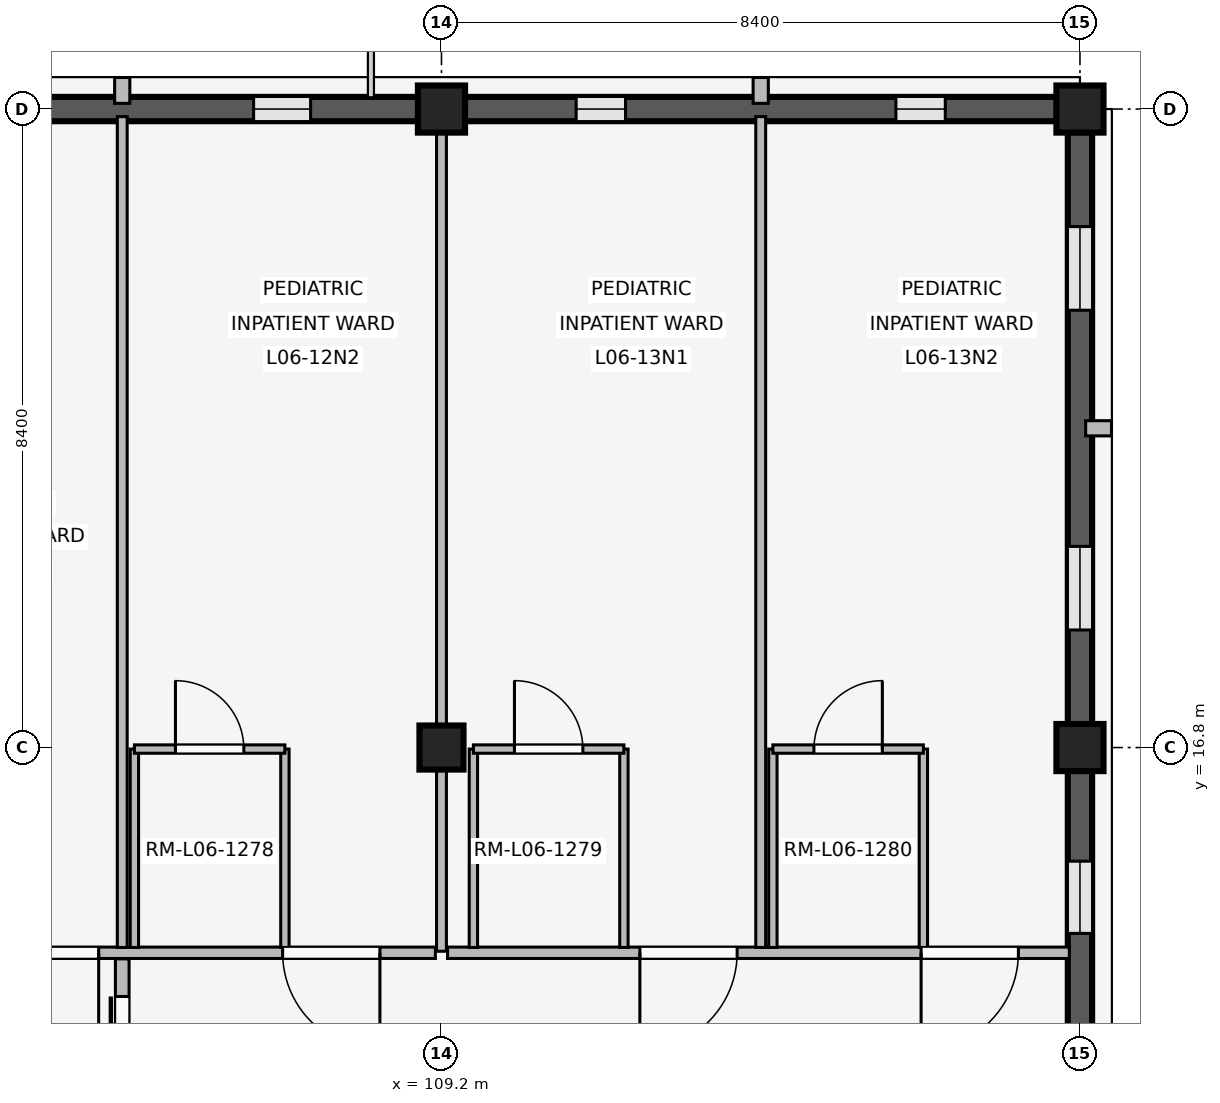
"""IFC4 building model, lengths in metres.
Left out: names, types, materials, properties, quantities, classifications, styles, units other than length and angle.
Written with IfcOpenShell. Run it as: python <this file> out.ifc"""

import sys

from ifc_helpers import new_model, si_unit, direction, frame, frame_2d, origin, origin_2d, place, context, subcontext, project, spatial, rectangle, extrude, element, fill, save


model = new_model("IFC4")
c1 = context("Model", 3, precision=1e-05, world=origin(), true_north=direction((0.0, 1.0)))
c2 = subcontext(c1, "Body", "Model", "MODEL_VIEW")
j1 = project(units=[si_unit("LENGTHUNIT", "METRE"), si_unit("PLANEANGLEUNIT", "RADIAN")], contexts=[c1])
p1 = place(None, origin())
s1 = spatial("IfcSite", under=j1, at=p1, CompositionType="ELEMENT")
p2 = place(p1, origin())
s2 = spatial("IfcBuilding", under=s1, at=p2, CompositionType="ELEMENT")
p3 = place(p2, frame((0.0, 0.0, 24.6)))
s3 = spatial("IfcBuildingStorey", under=s2, at=p3, CompositionType="ELEMENT", Elevation=24.6)
p4 = place(p3, frame((109.2, 16.8, 0.0), z_axis=(0.0, 0.0, 1.0), x_axis=(1.0, 0.0, 0.0)))
e1 = element("IfcColumn", 1, at=p4, inside=s3, PredefinedType="COLUMN", context=c2, shape_type="SweptSolid", body=[
    extrude(rectangle(XDim=0.58, YDim=0.58, at=origin_2d()), origin(), (0.0, 0.0, 1.0), 4.2),
])
for number, where, z_axis, x_axis in (
    (2, (109.2, 25.2, 0.0), (0.0, 0.0, 1.0), (1.0, 0.0, 0.0)),
    (3, (117.6, 16.8, 0.0), (0.0, 0.0, 1.0), (1.0, 0.0, 0.0)),
    (4, (117.6, 25.2, 0.0), (0.0, 0.0, 1.0), (1.0, 0.0, 0.0)),
):
    element("IfcColumn", number, at=place(p3, frame(where, z_axis=z_axis, x_axis=x_axis)), inside=s3, PredefinedType="COLUMN", context=c2, shape_type="SweptSolid", body=[
        extrude(rectangle(XDim=0.62, YDim=0.62, at=origin_2d()), origin(), (0.0, 0.0, 1.0), 4.2),
    ])
p5 = place(p3, frame((101.105, 25.2, 0.0), z_axis=(0.0, 0.0, 1.0), x_axis=(1.0, 0.0, 0.0)))
e5 = element("IfcWall", 5, at=p5, inside=s3, PredefinedType="SOLIDWALL", context=c2, shape_type="SweptSolid", body=[
    extrude(rectangle(XDim=7.79, YDim=0.32, at=frame_2d((3.895, 0.0))), origin(), (0.0, 0.0, 1.0), 3.34),
])
p6 = place(p5, frame((1.417, 0.0, 0.85)))
e6 = element("IfcOpeningElement", 6, at=p6, cuts=e5, PredefinedType="OPENING", context=c2, shape_type="SweptSolid", body=[
    extrude(rectangle(XDim=0.75, YDim=1.85, at=frame_2d((0.375, 0.925))), frame((0.0, 0.17, 0.0), z_axis=(0.0, -1.0, 0.0), x_axis=(1.0, 0.0, 0.0)), (0.0, 0.0, 1.0), 0.34),
])
p7 = place(p5, frame((5.623, 0.0, 0.85)))
e7 = element("IfcOpeningElement", 7, at=p7, cuts=e5, PredefinedType="OPENING", context=c2, shape_type="SweptSolid", body=[
    extrude(rectangle(XDim=0.75, YDim=1.85, at=frame_2d((0.375, 0.925))), frame((0.0, 0.17, 0.0), z_axis=(0.0, -1.0, 0.0), x_axis=(1.0, 0.0, 0.0)), (0.0, 0.0, 1.0), 0.34),
])
p8 = place(p3, frame((105.0, 25.275, 0.0), z_axis=(0.0, 0.0, 1.0), x_axis=(0.0, 1.0, 0.0)))
e8 = element("IfcWall", 8, at=p8, inside=s3, PredefinedType="ELEMENTEDWALL", context=c2, shape_type="SweptSolid", body=[
    extrude(rectangle(XDim=0.34, YDim=0.2, at=frame_2d((0.17, 0.0))), origin(), (0.0, 0.0, 1.0), 3.32),
])
p9 = place(p3, frame((117.6, 16.495, 0.0), z_axis=(0.0, 0.0, 1.0), x_axis=(0.0, -1.0, 0.0)))
e9 = element("IfcWall", 9, at=p9, inside=s3, PredefinedType="SOLIDWALL", context=c2, shape_type="SweptSolid", body=[
    extrude(rectangle(XDim=7.79, YDim=0.32, at=frame_2d((3.895, 0.0))), origin(), (0.0, 0.0, 1.0), 3.34),
])
p10 = place(p9, frame((1.19, 0.0, 0.85)))
e10 = element("IfcOpeningElement", 10, at=p10, cuts=e9, PredefinedType="OPENING", context=c2, shape_type="SweptSolid", body=[
    extrude(rectangle(XDim=0.95, YDim=1.6, at=frame_2d((0.475, 0.8))), frame((0.0, 0.17, 0.0), z_axis=(0.0, -1.0, 0.0), x_axis=(1.0, 0.0, 0.0)), (0.0, 0.0, 1.0), 0.34),
])
p11 = place(p9, frame((5.65, 0.0, 0.85)))
e11 = element("IfcOpeningElement", 11, at=p11, cuts=e9, PredefinedType="OPENING", context=c2, shape_type="SweptSolid", body=[
    extrude(rectangle(XDim=0.95, YDim=1.6, at=frame_2d((0.475, 0.8))), frame((0.0, 0.17, 0.0), z_axis=(0.0, -1.0, 0.0), x_axis=(1.0, 0.0, 0.0)), (0.0, 0.0, 1.0), 0.34),
])
p12 = place(p3, frame((109.505, 25.2, 0.0), z_axis=(0.0, 0.0, 1.0), x_axis=(1.0, 0.0, 0.0)))
e12 = element("IfcWall", 12, at=p12, inside=s3, PredefinedType="SOLIDWALL", context=c2, shape_type="SweptSolid", body=[
    extrude(rectangle(XDim=7.79, YDim=0.32, at=frame_2d((3.895, 0.0))), origin(), (0.0, 0.0, 1.0), 3.34),
])
p13 = place(p12, frame((1.467, 0.0, 0.85)))
e13 = element("IfcOpeningElement", 13, at=p13, cuts=e12, PredefinedType="OPENING", context=c2, shape_type="SweptSolid", body=[
    extrude(rectangle(XDim=0.65, YDim=1.75, at=frame_2d((0.325, 0.875))), frame((0.0, 0.17, 0.0), z_axis=(0.0, -1.0, 0.0), x_axis=(1.0, 0.0, 0.0)), (0.0, 0.0, 1.0), 0.34),
])
p14 = place(p12, frame((5.673, 0.0, 0.85)))
e14 = element("IfcOpeningElement", 14, at=p14, cuts=e12, PredefinedType="OPENING", context=c2, shape_type="SweptSolid", body=[
    extrude(rectangle(XDim=0.65, YDim=1.75, at=frame_2d((0.325, 0.875))), frame((0.0, 0.17, 0.0), z_axis=(0.0, -1.0, 0.0), x_axis=(1.0, 0.0, 0.0)), (0.0, 0.0, 1.0), 0.34),
])
p15 = place(p3, frame((113.4, 25.275, 0.0), z_axis=(0.0, 0.0, 1.0), x_axis=(0.0, 1.0, 0.0)))
e15 = element("IfcWall", 15, at=p15, inside=s3, PredefinedType="ELEMENTEDWALL", context=c2, shape_type="SweptSolid", body=[
    extrude(rectangle(XDim=0.34, YDim=0.2, at=frame_2d((0.17, 0.0))), origin(), (0.0, 0.0, 1.0), 3.32),
])
p16 = place(p3, frame((117.6, 24.895, 0.0), z_axis=(0.0, 0.0, 1.0), x_axis=(0.0, -1.0, 0.0)))
e16 = element("IfcWall", 16, at=p16, inside=s3, PredefinedType="SOLIDWALL", context=c2, shape_type="SweptSolid", body=[
    extrude(rectangle(XDim=7.79, YDim=0.32, at=frame_2d((3.895, 0.0))), origin(), (0.0, 0.0, 1.0), 3.34),
])
p17 = place(p16, frame((1.242, 0.0, 0.85)))
e17 = element("IfcOpeningElement", 17, at=p17, cuts=e16, PredefinedType="OPENING", context=c2, shape_type="SweptSolid", body=[
    extrude(rectangle(XDim=1.1, YDim=1.6, at=frame_2d((0.55, 0.8))), frame((0.0, 0.17, 0.0), z_axis=(0.0, -1.0, 0.0), x_axis=(1.0, 0.0, 0.0)), (0.0, 0.0, 1.0), 0.34),
])
p18 = place(p16, frame((5.448, 0.0, 0.85)))
e18 = element("IfcOpeningElement", 18, at=p18, cuts=e16, PredefinedType="OPENING", context=c2, shape_type="SweptSolid", body=[
    extrude(rectangle(XDim=1.1, YDim=1.6, at=frame_2d((0.55, 0.8))), frame((0.0, 0.17, 0.0), z_axis=(0.0, -1.0, 0.0), x_axis=(1.0, 0.0, 0.0)), (0.0, 0.0, 1.0), 0.34),
])
p19 = place(p3, frame((117.675, 21.0, 0.0), z_axis=(0.0, 0.0, 1.0), x_axis=(1.0, 0.0, 0.0)))
e19 = element("IfcWall", 19, at=p19, inside=s3, PredefinedType="ELEMENTEDWALL", context=c2, shape_type="SweptSolid", body=[
    extrude(rectangle(XDim=0.34, YDim=0.2, at=frame_2d((0.17, 0.0))), origin(), (0.0, 0.0, 1.0), 3.32),
])
p20 = place(p3, frame((109.12, 14.1, 0.0), z_axis=(0.0, 0.0, 1.0), x_axis=(-1.0, 0.0, 0.0)))
e20 = element("IfcWall", 20, at=p20, inside=s3, PredefinedType="PARTITIONING", context=c2, shape_type="SweptSolid", body=[
    extrude(rectangle(XDim=7.96, YDim=0.15, at=frame_2d((3.98, 0.0))), origin(), (0.0, 0.0, 1.0), 3.32),
])
p21 = place(p20, frame((0.73, 0.0, 0.0)))
e21 = element("IfcOpeningElement", 21, at=p21, cuts=e20, PredefinedType="OPENING", context=c2, shape_type="SweptSolid", body=[
    extrude(rectangle(XDim=1.28, YDim=2.2, at=frame_2d((0.64, 1.1))), frame((0.0, 0.085, 0.0), z_axis=(0.0, -1.0, 0.0), x_axis=(1.0, 0.0, 0.0)), (0.0, 0.0, 1.0), 0.17),
])
p22 = place(p20, frame((4.43, 0.0, 0.0)))
e22 = element("IfcOpeningElement", 22, at=p22, cuts=e20, PredefinedType="OPENING", context=c2, shape_type="SweptSolid", body=[
    extrude(rectangle(XDim=1.28, YDim=2.2, at=frame_2d((0.64, 1.1))), frame((0.0, 0.085, 0.0), z_axis=(0.0, -1.0, 0.0), x_axis=(1.0, 0.0, 0.0)), (0.0, 0.0, 1.0), 0.17),
])
p23 = place(p3, frame((105.0, 14.17, 0.0), z_axis=(0.0, 0.0, 1.0), x_axis=(0.0, 1.0, 0.0)))
e23 = element("IfcWall", 23, at=p23, inside=s3, PredefinedType="PARTITIONING", context=c2, shape_type="SweptSolid", body=[
    extrude(rectangle(XDim=10.93, YDim=0.13, at=frame_2d((5.465, 0.0))), origin(), (0.0, 0.0, 1.0), 3.32),
])
for number, where, z_axis, x_axis in (
    (24, (105.16, 14.17, 0.0), (0.0, 0.0, 1.0), (0.0, 1.0, 0.0)),
    (25, (107.14, 14.17, 0.0), (0.0, 0.0, 1.0), (0.0, 1.0, 0.0)),
):
    element("IfcWall", number, at=place(p3, frame(where, z_axis=z_axis, x_axis=x_axis)), inside=s3, PredefinedType="PARTITIONING", context=c2, shape_type="SweptSolid", body=[
        extrude(rectangle(XDim=2.61, YDim=0.11, at=frame_2d((1.305, 0.0))), origin(), (0.0, 0.0, 1.0), 3.32),
    ])
p24 = place(p3, frame((105.16, 16.78, 0.0), z_axis=(0.0, 0.0, 1.0), x_axis=(1.0, 0.0, 0.0)))
e26 = element("IfcWall", 26, at=p24, inside=s3, PredefinedType="PARTITIONING", context=c2, shape_type="SweptSolid", body=[
    extrude(rectangle(XDim=1.98, YDim=0.11, at=frame_2d((0.99, 0.0))), origin(), (0.0, 0.0, 1.0), 3.32),
])
p25 = place(p24, frame((0.54, 0.0, 0.0)))
e27 = element("IfcOpeningElement", 27, at=p25, cuts=e26, PredefinedType="OPENING", context=c2, shape_type="SweptSolid", body=[
    extrude(rectangle(XDim=0.9, YDim=2.1, at=frame_2d((0.45, 1.05))), frame((0.0, 0.065, 0.0), z_axis=(0.0, -1.0, 0.0), x_axis=(1.0, 0.0, 0.0)), (0.0, 0.0, 1.0), 0.13),
])
p26 = place(p3, frame((105.0, 11.18, 0.0), z_axis=(0.0, 0.0, 1.0), x_axis=(0.0, 1.0, 0.0)))
e28 = element("IfcWall", 28, at=p26, inside=s3, PredefinedType="PARTITIONING", context=c2, shape_type="SweptSolid", body=[
    extrude(rectangle(XDim=2.84, YDim=0.18, at=frame_2d((1.42, 0.0))), origin(), (0.0, 0.0, 1.0), 3.32),
])
p27 = place(p26, frame((0.495, 0.0, 0.0)))
e29 = element("IfcOpeningElement", 29, at=p27, cuts=e28, PredefinedType="OPENING", context=c2, shape_type="SweptSolid", body=[
    extrude(rectangle(XDim=1.85, YDim=2.3, at=frame_2d((0.925, 1.15))), frame((0.0, 0.1, 0.0), z_axis=(0.0, -1.0, 0.0), x_axis=(1.0, 0.0, 0.0)), (0.0, 0.0, 1.0), 0.2),
])
p28 = place(p3, frame((109.2, 14.12, 0.0), z_axis=(0.0, 0.0, 1.0), x_axis=(0.0, 1.0, 0.0)))
e30 = element("IfcWall", 30, at=p28, inside=s3, PredefinedType="PARTITIONING", context=c2, shape_type="SweptSolid", body=[
    extrude(rectangle(XDim=10.94, YDim=0.13, at=frame_2d((5.47, 0.0))), origin(), (0.0, 0.0, 1.0), 3.32),
])
p29 = place(p3, frame((117.46, 14.1, 0.0), z_axis=(0.0, 0.0, 1.0), x_axis=(-1.0, 0.0, 0.0)))
e31 = element("IfcWall", 31, at=p29, inside=s3, PredefinedType="PARTITIONING", context=c2, shape_type="SweptSolid", body=[
    extrude(rectangle(XDim=8.18, YDim=0.15, at=frame_2d((4.09, 0.0))), origin(), (0.0, 0.0, 1.0), 3.32),
])
p30 = place(p29, frame((0.67, 0.0, 0.0)))
e32 = element("IfcOpeningElement", 32, at=p30, cuts=e31, PredefinedType="OPENING", context=c2, shape_type="SweptSolid", body=[
    extrude(rectangle(XDim=1.28, YDim=2.2, at=frame_2d((0.64, 1.1))), frame((0.0, 0.085, 0.0), z_axis=(0.0, -1.0, 0.0), x_axis=(1.0, 0.0, 0.0)), (0.0, 0.0, 1.0), 0.17),
])
p31 = place(p29, frame((4.37, 0.0, 0.0)))
e33 = element("IfcOpeningElement", 33, at=p31, cuts=e31, PredefinedType="OPENING", context=c2, shape_type="SweptSolid", body=[
    extrude(rectangle(XDim=1.28, YDim=2.2, at=frame_2d((0.64, 1.1))), frame((0.0, 0.085, 0.0), z_axis=(0.0, -1.0, 0.0), x_axis=(1.0, 0.0, 0.0)), (0.0, 0.0, 1.0), 0.17),
])
p32 = place(p3, frame((113.4, 14.17, 0.0), z_axis=(0.0, 0.0, 1.0), x_axis=(0.0, 1.0, 0.0)))
e34 = element("IfcWall", 34, at=p32, inside=s3, PredefinedType="PARTITIONING", context=c2, shape_type="SweptSolid", body=[
    extrude(rectangle(XDim=10.93, YDim=0.13, at=frame_2d((5.465, 0.0))), origin(), (0.0, 0.0, 1.0), 3.32),
])
for number, where, z_axis, x_axis in (
    (35, (109.62, 14.17, 0.0), (0.0, 0.0, 1.0), (0.0, 1.0, 0.0)),
    (36, (111.6, 14.17, 0.0), (0.0, 0.0, 1.0), (0.0, 1.0, 0.0)),
):
    element("IfcWall", number, at=place(p3, frame(where, z_axis=z_axis, x_axis=x_axis)), inside=s3, PredefinedType="PARTITIONING", context=c2, shape_type="SweptSolid", body=[
        extrude(rectangle(XDim=2.61, YDim=0.11, at=frame_2d((1.305, 0.0))), origin(), (0.0, 0.0, 1.0), 3.32),
    ])
p33 = place(p3, frame((109.62, 16.78, 0.0), z_axis=(0.0, 0.0, 1.0), x_axis=(1.0, 0.0, 0.0)))
e37 = element("IfcWall", 37, at=p33, inside=s3, PredefinedType="PARTITIONING", context=c2, shape_type="SweptSolid", body=[
    extrude(rectangle(XDim=1.98, YDim=0.11, at=frame_2d((0.99, 0.0))), origin(), (0.0, 0.0, 1.0), 3.32),
])
p34 = place(p33, frame((0.54, 0.0, 0.0)))
e38 = element("IfcOpeningElement", 38, at=p34, cuts=e37, PredefinedType="OPENING", context=c2, shape_type="SweptSolid", body=[
    extrude(rectangle(XDim=0.9, YDim=2.1, at=frame_2d((0.45, 1.05))), frame((0.0, 0.065, 0.0), z_axis=(0.0, -1.0, 0.0), x_axis=(1.0, 0.0, 0.0)), (0.0, 0.0, 1.0), 0.13),
])
for number, where, z_axis, x_axis in (
    (39, (113.56, 14.17, 0.0), (0.0, 0.0, 1.0), (0.0, 1.0, 0.0)),
    (40, (115.54, 14.17, 0.0), (0.0, 0.0, 1.0), (0.0, 1.0, 0.0)),
):
    element("IfcWall", number, at=place(p3, frame(where, z_axis=z_axis, x_axis=x_axis)), inside=s3, PredefinedType="PARTITIONING", context=c2, shape_type="SweptSolid", body=[
        extrude(rectangle(XDim=2.61, YDim=0.11, at=frame_2d((1.305, 0.0))), origin(), (0.0, 0.0, 1.0), 3.32),
    ])
p35 = place(p3, frame((113.56, 16.78, 0.0), z_axis=(0.0, 0.0, 1.0), x_axis=(1.0, 0.0, 0.0)))
e41 = element("IfcWall", 41, at=p35, inside=s3, PredefinedType="PARTITIONING", context=c2, shape_type="SweptSolid", body=[
    extrude(rectangle(XDim=1.98, YDim=0.11, at=frame_2d((0.99, 0.0))), origin(), (0.0, 0.0, 1.0), 3.32),
])
p36 = place(p35, frame((0.54, 0.0, 0.0)))
e42 = element("IfcOpeningElement", 42, at=p36, cuts=e41, PredefinedType="OPENING", context=c2, shape_type="SweptSolid", body=[
    extrude(rectangle(XDim=0.9, YDim=2.1, at=frame_2d((0.45, 1.05))), frame((0.0, 0.065, 0.0), z_axis=(0.0, -1.0, 0.0), x_axis=(1.0, 0.0, 0.0)), (0.0, 0.0, 1.0), 0.13),
])
p37 = place(p7, origin())
e43 = element("IfcWindow", 43, at=p37, inside=s3, PartitioningType="SINGLE_PANEL", PredefinedType="WINDOW", context=c2, shape_type="SweptSolid", body=[
    extrude(rectangle(XDim=0.75, YDim=1.85, at=frame_2d((0.375, 0.925))), frame((0.0, 0.03, 0.0), z_axis=(0.0, -1.0, 0.0), x_axis=(1.0, 0.0, 0.0)), (0.0, 0.0, 1.0), 0.06),
])
fill(e7, e43)
p38 = place(p10, origin())
e44 = element("IfcWindow", 44, at=p38, inside=s3, PartitioningType="SINGLE_PANEL", PredefinedType="WINDOW", context=c2, shape_type="SweptSolid", body=[
    extrude(rectangle(XDim=0.95, YDim=1.6, at=frame_2d((0.475, 0.8))), frame((0.0, 0.03, 0.0), z_axis=(0.0, -1.0, 0.0), x_axis=(1.0, 0.0, 0.0)), (0.0, 0.0, 1.0), 0.06),
])
fill(e10, e44)
p39 = place(p13, origin())
e45 = element("IfcWindow", 45, at=p39, inside=s3, PartitioningType="SINGLE_PANEL", PredefinedType="WINDOW", context=c2, shape_type="SweptSolid", body=[
    extrude(rectangle(XDim=0.65, YDim=1.75, at=frame_2d((0.325, 0.875))), frame((0.0, 0.03, 0.0), z_axis=(0.0, -1.0, 0.0), x_axis=(1.0, 0.0, 0.0)), (0.0, 0.0, 1.0), 0.06),
])
fill(e13, e45)
p40 = place(p14, origin())
e46 = element("IfcWindow", 46, at=p40, inside=s3, PartitioningType="SINGLE_PANEL", PredefinedType="WINDOW", context=c2, shape_type="SweptSolid", body=[
    extrude(rectangle(XDim=0.65, YDim=1.75, at=frame_2d((0.325, 0.875))), frame((0.0, 0.03, 0.0), z_axis=(0.0, -1.0, 0.0), x_axis=(1.0, 0.0, 0.0)), (0.0, 0.0, 1.0), 0.06),
])
fill(e14, e46)
p41 = place(p17, origin())
e47 = element("IfcWindow", 47, at=p41, inside=s3, PartitioningType="SINGLE_PANEL", PredefinedType="WINDOW", context=c2, shape_type="SweptSolid", body=[
    extrude(rectangle(XDim=1.1, YDim=1.6, at=frame_2d((0.55, 0.8))), frame((0.0, 0.03, 0.0), z_axis=(0.0, -1.0, 0.0), x_axis=(1.0, 0.0, 0.0)), (0.0, 0.0, 1.0), 0.06),
])
fill(e17, e47)
p42 = place(p18, origin())
e48 = element("IfcWindow", 48, at=p42, inside=s3, PartitioningType="SINGLE_PANEL", PredefinedType="WINDOW", context=c2, shape_type="SweptSolid", body=[
    extrude(rectangle(XDim=1.1, YDim=1.6, at=frame_2d((0.55, 0.8))), frame((0.0, 0.03, 0.0), z_axis=(0.0, -1.0, 0.0), x_axis=(1.0, 0.0, 0.0)), (0.0, 0.0, 1.0), 0.06),
])
fill(e18, e48)
p43 = place(p21, origin())
e49 = element("IfcDoor", 49, at=p43, inside=s3, OperationType="SINGLE_SWING_LEFT", PredefinedType="DOOR", context=c2, shape_type="SweptSolid", body=[
    extrude(rectangle(XDim=1.28, YDim=2.2, at=frame_2d((0.64, 1.1))), frame((0.0, 0.025, 0.0), z_axis=(0.0, -1.0, 0.0), x_axis=(1.0, 0.0, 0.0)), (0.0, 0.0, 1.0), 0.05),
])
fill(e21, e49)
p44 = place(p22, origin())
e50 = element("IfcDoor", 50, at=p44, inside=s3, OperationType="SINGLE_SWING_LEFT", PredefinedType="DOOR", context=c2, shape_type="SweptSolid", body=[
    extrude(rectangle(XDim=1.28, YDim=2.2, at=frame_2d((0.64, 1.1))), frame((0.0, 0.025, 0.0), z_axis=(0.0, -1.0, 0.0), x_axis=(1.0, 0.0, 0.0)), (0.0, 0.0, 1.0), 0.05),
])
fill(e22, e50)
p45 = place(p25, origin())
e51 = element("IfcDoor", 51, at=p45, inside=s3, OperationType="SINGLE_SWING_LEFT", PredefinedType="DOOR", context=c2, shape_type="SweptSolid", body=[
    extrude(rectangle(XDim=0.9, YDim=2.1, at=frame_2d((0.45, 1.05))), frame((0.0, 0.025, 0.0), z_axis=(0.0, -1.0, 0.0), x_axis=(1.0, 0.0, 0.0)), (0.0, 0.0, 1.0), 0.05),
])
fill(e27, e51)
p46 = place(p27, origin())
e52 = element("IfcDoor", 52, at=p46, inside=s3, OperationType="SLIDING_TO_LEFT", PredefinedType="DOOR", context=c2, shape_type="SweptSolid", body=[
    extrude(rectangle(XDim=1.85, YDim=2.3, at=frame_2d((0.925, 1.15))), frame((0.0, 0.025, 0.0), z_axis=(0.0, -1.0, 0.0), x_axis=(1.0, 0.0, 0.0)), (0.0, 0.0, 1.0), 0.05),
])
fill(e29, e52)
p47 = place(p30, origin())
e53 = element("IfcDoor", 53, at=p47, inside=s3, OperationType="SINGLE_SWING_RIGHT", PredefinedType="DOOR", context=c2, shape_type="SweptSolid", body=[
    extrude(rectangle(XDim=1.28, YDim=2.2, at=frame_2d((0.64, 1.1))), frame((0.0, 0.025, 0.0), z_axis=(0.0, -1.0, 0.0), x_axis=(1.0, 0.0, 0.0)), (0.0, 0.0, 1.0), 0.05),
])
fill(e32, e53)
p48 = place(p31, origin())
e54 = element("IfcDoor", 54, at=p48, inside=s3, OperationType="SINGLE_SWING_RIGHT", PredefinedType="DOOR", context=c2, shape_type="SweptSolid", body=[
    extrude(rectangle(XDim=1.28, YDim=2.2, at=frame_2d((0.64, 1.1))), frame((0.0, 0.025, 0.0), z_axis=(0.0, -1.0, 0.0), x_axis=(1.0, 0.0, 0.0)), (0.0, 0.0, 1.0), 0.05),
])
fill(e33, e54)
p49 = place(p34, origin())
e55 = element("IfcDoor", 55, at=p49, inside=s3, OperationType="SINGLE_SWING_LEFT", PredefinedType="DOOR", context=c2, shape_type="SweptSolid", body=[
    extrude(rectangle(XDim=0.9, YDim=2.1, at=frame_2d((0.45, 1.05))), frame((0.0, 0.025, 0.0), z_axis=(0.0, -1.0, 0.0), x_axis=(1.0, 0.0, 0.0)), (0.0, 0.0, 1.0), 0.05),
])
fill(e38, e55)
p50 = place(p36, origin())
e56 = element("IfcDoor", 56, at=p50, inside=s3, OperationType="SINGLE_SWING_RIGHT", PredefinedType="DOOR", context=c2, shape_type="SweptSolid", body=[
    extrude(rectangle(XDim=0.9, YDim=2.1, at=frame_2d((0.45, 1.05))), frame((0.0, 0.025, 0.0), z_axis=(0.0, -1.0, 0.0), x_axis=(1.0, 0.0, 0.0)), (0.0, 0.0, 1.0), 0.05),
])
fill(e42, e56)
save(model, sys.argv[1])
